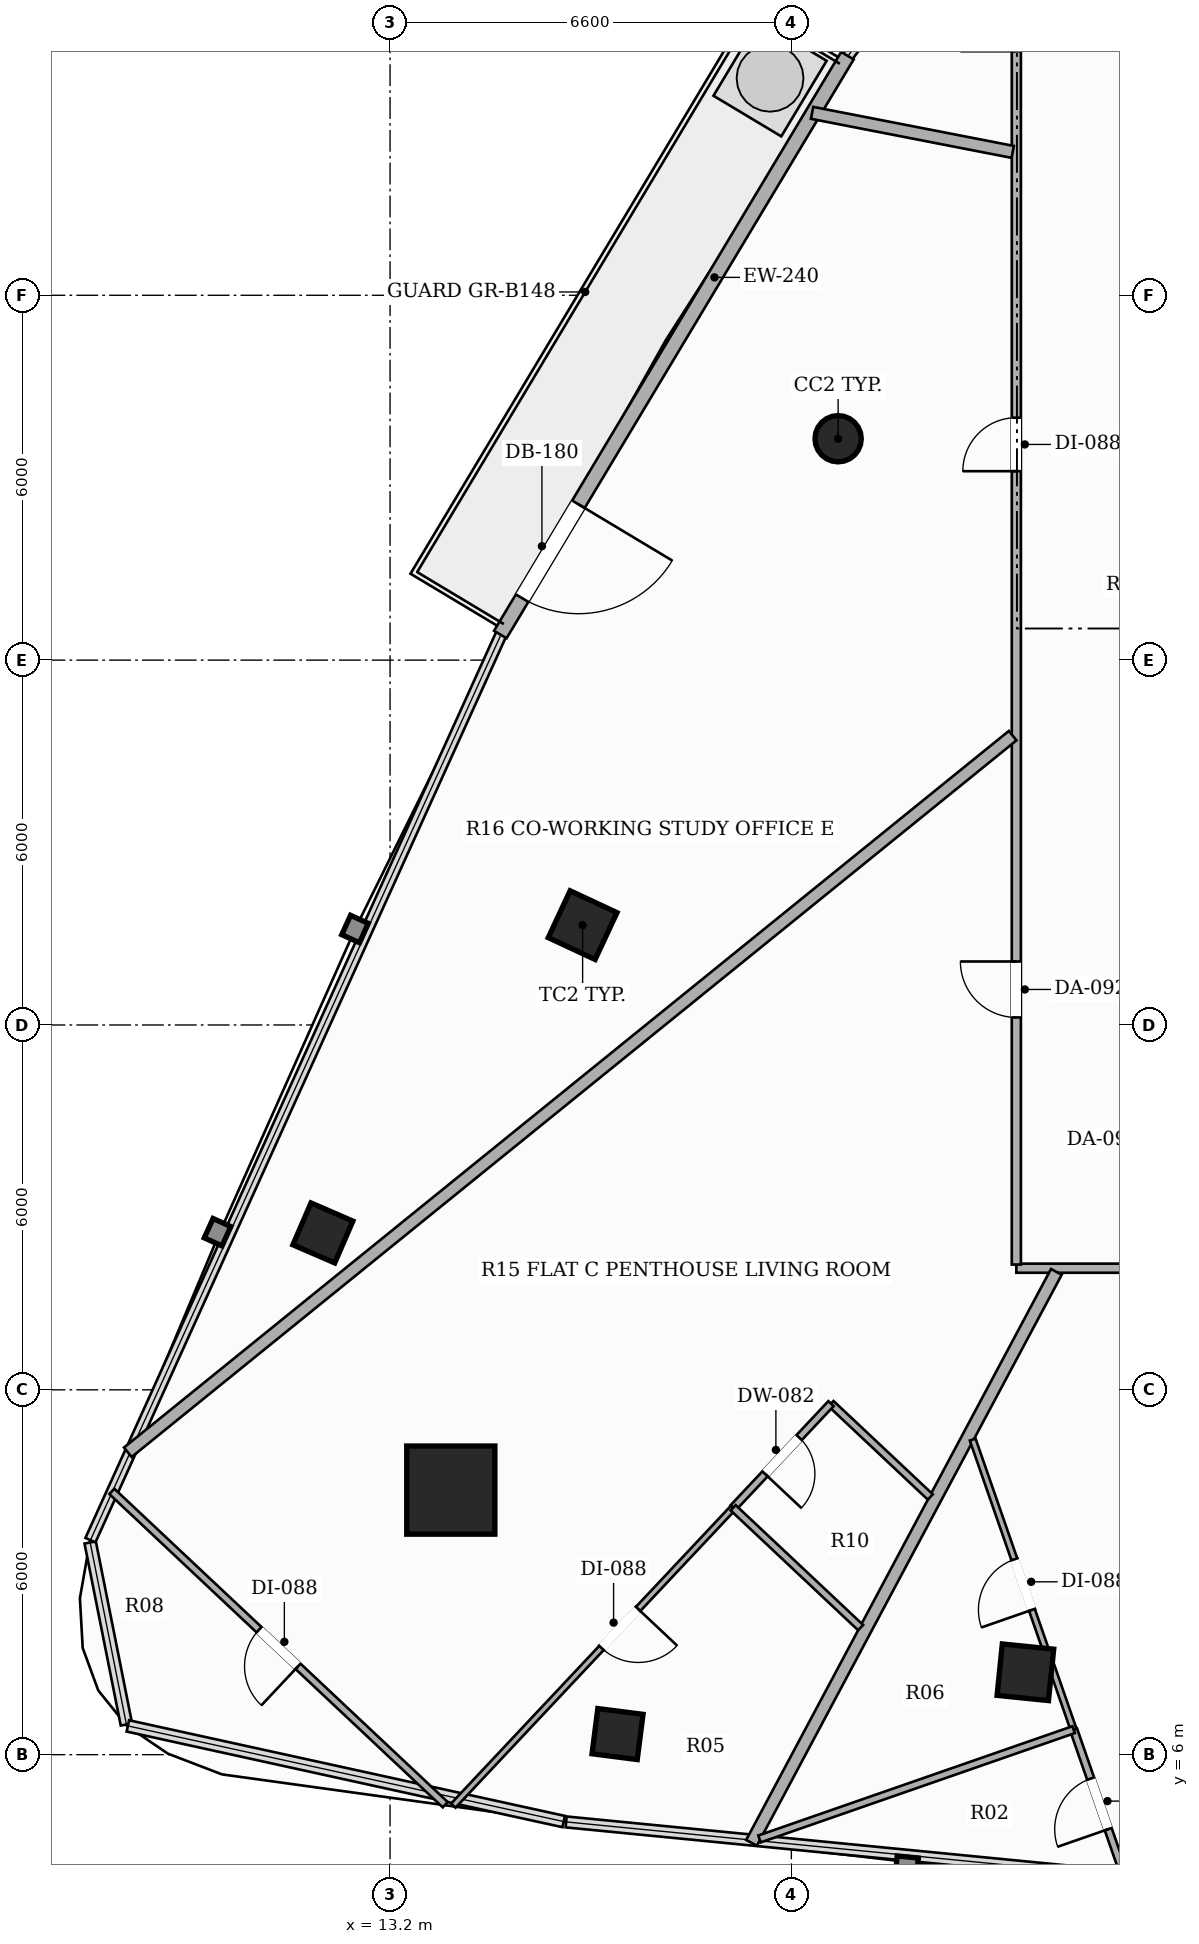
"""IFC4 building model, lengths in metres.
Left out: names, types, materials, properties, quantities, classifications, styles, units other than length and angle.
Written with IfcOpenShell. Run it as: python <this file> out.ifc"""

import sys

from ifc_helpers import new_model, si_unit, direction, frame, frame_2d, origin, origin_2d, place, context, subcontext, project, spatial, rectangle, hollow_rectangle, hollow_circle, extrude, element, fill, save


model = new_model("IFC4")
c1 = context("Model", 3, precision=1e-05, world=origin(), true_north=direction((0.0, 1.0)))
c2 = subcontext(c1, "Body", "Model", "MODEL_VIEW")
j1 = project(units=[si_unit("LENGTHUNIT", "METRE"), si_unit("PLANEANGLEUNIT", "RADIAN")], contexts=[c1])
p1 = place(None, origin())
s1 = spatial("IfcSite", under=j1, at=p1, CompositionType="ELEMENT")
p2 = place(p1, origin())
s2 = spatial("IfcBuilding", under=s1, at=p2, CompositionType="ELEMENT")
p3 = place(p2, frame((0.0, 0.0, 167.15)))
s3 = spatial("IfcBuildingStorey", under=s2, at=p3, CompositionType="ELEMENT", Elevation=167.15)
p4 = place(p3, frame((14.199, 10.351, 0.0), z_axis=(0.0, 0.0, 1.0), x_axis=(1.0, 0.0, 0.0)))
e1 = element("IfcColumn", 1, at=p4, inside=s3, PredefinedType="COLUMN", context=c2, shape_type="SweptSolid", body=[
    extrude(hollow_rectangle(XDim=1.45, YDim=1.45, WallThickness=0.045, at=origin_2d()), origin(), (0.0, 0.0, 1.0), 3.3),
])
p5 = place(p3, frame((20.569, 27.641, 0.0), z_axis=(0.0, 0.0, 1.0), x_axis=(1.0, 0.0, 0.0)))
e2 = element("IfcColumn", 2, at=p5, inside=s3, PredefinedType="COLUMN", context=c2, shape_type="SweptSolid", body=[
    extrude(hollow_circle(Radius=0.381, WallThickness=0.022, at=origin_2d()), origin(), (0.0, 0.0, 1.0), 3.3),
])
for number, where, z_axis, x_axis in (
    (3, (16.367, 19.642, 0.0), (0.0, 0.0, 1.0), (0.423, 0.906, 0.0)),
    (4, (23.649, 7.355, 0.0), (0.0, 0.0, 1.0), (-0.995, 0.101, 0.0)),
):
    element("IfcColumn", number, at=place(p3, frame(where, z_axis=z_axis, x_axis=x_axis)), inside=s3, PredefinedType="COLUMN", context=c2, shape_type="SweptSolid", body=[
        extrude(hollow_rectangle(XDim=0.85, YDim=0.85, WallThickness=0.028, at=origin_2d()), origin(), (0.0, 0.0, 1.0), 3.3),
    ])
for number, where, z_axis, x_axis in (
    (5, (12.095, 14.58, 0.0), (0.0, 0.0, 1.0), (0.397, 0.918, 0.0)),
    (6, (16.941, 6.339, 0.0), (0.0, 0.0, 1.0), (-0.992, 0.127, 0.0)),
):
    element("IfcColumn", number, at=place(p3, frame(where, z_axis=z_axis, x_axis=x_axis)), inside=s3, PredefinedType="COLUMN", context=c2, shape_type="SweptSolid", body=[
        extrude(hollow_rectangle(XDim=0.75, YDim=0.75, WallThickness=0.025, at=origin_2d()), origin(), (0.0, 0.0, 1.0), 3.3),
    ])
p6 = place(p3, frame((20.722, 33.94, 0.0), z_axis=(0.0, 0.0, 1.0), x_axis=(-0.514334017412, -0.85758994778, 0.0)))
e7 = element("IfcWall", 7, at=p6, inside=s3, PredefinedType="SOLIDWALL", context=c2, shape_type="SweptSolid", body=[
    extrude(rectangle(XDim=11.1, YDim=0.24, at=frame_2d((5.55, 0.0))), origin(), (0.0, 0.0, 1.0), 2.624),
])
p7 = place(p6, frame((8.602, 0.0, 0.0)))
e8 = element("IfcOpeningElement", 8, at=p7, cuts=e7, PredefinedType="OPENING", context=c2, shape_type="SweptSolid", body=[
    extrude(rectangle(XDim=1.8, YDim=2.2, at=frame_2d((0.9, 1.1))), frame((0.0, 0.13, 0.0), z_axis=(0.0, -1.0, 0.0), x_axis=(1.0, 0.0, 0.0)), (0.0, 0.0, 1.0), 0.26),
])
p8 = place(p3, frame((26.09, 14.0, 0.0), z_axis=(0.0, 0.0, 1.0), x_axis=(-1.0, 0.0, 0.0)))
e9 = element("IfcWall", 9, at=p8, inside=s3, PredefinedType="PARTITIONING", context=c2, shape_type="SweptSolid", body=[
    extrude(rectangle(XDim=2.59, YDim=0.15, at=frame_2d((1.295, 0.0))), origin(), (0.0, 0.0, 1.0), 2.721),
])
p9 = place(p3, frame((23.5, 14.06, 0.0), z_axis=(0.0, 0.0, 1.0), x_axis=(0.0, 1.0, 0.0)))
e10 = element("IfcWall", 10, at=p9, inside=s3, PredefinedType="PARTITIONING", context=c2, shape_type="SweptSolid", body=[
    extrude(rectangle(XDim=22.84, YDim=0.15, at=frame_2d((11.42, 0.0))), origin(), (0.0, 0.0, 1.0), 2.413),
])
p10 = place(p9, frame((4.064, 0.0, 0.0)))
e11 = element("IfcOpeningElement", 11, at=p10, cuts=e10, PredefinedType="OPENING", context=c2, shape_type="SweptSolid", body=[
    extrude(rectangle(XDim=0.92, YDim=2.15, at=frame_2d((0.46, 1.075))), frame((0.0, 0.085, 0.0), z_axis=(0.0, -1.0, 0.0), x_axis=(1.0, 0.0, 0.0)), (0.0, 0.0, 1.0), 0.17),
])
p11 = place(p9, frame((13.047, 0.0, 0.0)))
e12 = element("IfcOpeningElement", 12, at=p11, cuts=e10, PredefinedType="OPENING", context=c2, shape_type="SweptSolid", body=[
    extrude(rectangle(XDim=0.88, YDim=2.1, at=frame_2d((0.44, 1.05))), frame((0.0, 0.085, 0.0), z_axis=(0.0, -1.0, 0.0), x_axis=(1.0, 0.0, 0.0)), (0.0, 0.0, 1.0), 0.17),
])
p12 = place(p9, frame((19.953, 0.0, 0.0)))
e13 = element("IfcOpeningElement", 13, at=p12, cuts=e10, PredefinedType="OPENING", context=c2, shape_type="SweptSolid", body=[
    extrude(rectangle(XDim=0.92, YDim=2.15, at=frame_2d((0.46, 1.075))), frame((0.0, 0.085, 0.0), z_axis=(0.0, -1.0, 0.0), x_axis=(1.0, 0.0, 0.0)), (0.0, 0.0, 1.0), 0.17),
])
p13 = place(p3, frame((19.145, 4.55, 0.0), z_axis=(0.0, 0.0, 1.0), x_axis=(0.470953669838, 0.882157945533, 0.0)))
e14 = element("IfcWall", 14, at=p13, inside=s3, PredefinedType="PARTITIONING", context=c2, shape_type="SweptSolid", body=[
    extrude(rectangle(XDim=10.644, YDim=0.2, at=frame_2d((5.322, 0.0))), origin(), (0.0, 0.0, 1.0), 2.413),
])
p14 = place(p3, frame((8.887, 10.973, 0.0), z_axis=(0.0, 0.0, 1.0), x_axis=(0.777135864284, 0.629332859815, 0.0)))
e15 = element("IfcWall", 15, at=p14, inside=s3, PredefinedType="PARTITIONING", context=c2, shape_type="SweptSolid", body=[
    extrude(rectangle(XDim=18.726, YDim=0.2, at=frame_2d((9.363, 0.0))), origin(), (0.0, 0.0, 1.0), 2.413),
])
p15 = place(p3, frame((20.141, 33.0, 0.0), z_axis=(0.0, 0.0, 1.0), x_axis=(0.981579076432, -0.191056318163, 0.0)))
e16 = element("IfcWall", 16, at=p15, inside=s3, PredefinedType="PARTITIONING", context=c2, shape_type="SweptSolid", body=[
    extrude(rectangle(XDim=3.361, YDim=0.2, at=frame_2d((1.68, 0.0))), origin(), (0.0, 0.0, 1.0), 2.413),
])
p16 = place(p3, frame((25.291, 3.969, 0.0), z_axis=(0.0, 0.0, 1.0), x_axis=(-0.328440044658, 0.944524820778, 0.0)))
e17 = element("IfcWall", 17, at=p16, inside=s3, PredefinedType="PARTITIONING", context=c2, shape_type="SweptSolid", body=[
    extrude(rectangle(XDim=2.585, YDim=0.12, at=frame_2d((1.292, 0.0))), origin(), (0.0, 0.0, 1.0), 3.06),
])
p17 = place(p16, frame((0.853, 0.0, 0.0)))
e18 = element("IfcOpeningElement", 18, at=p17, cuts=e17, PredefinedType="OPENING", context=c2, shape_type="SweptSolid", body=[
    extrude(rectangle(XDim=0.88, YDim=2.1, at=frame_2d((0.44, 1.05))), frame((0.0, 0.07, 0.0), z_axis=(0.0, -1.0, 0.0), x_axis=(1.0, 0.0, 0.0)), (0.0, 0.0, 1.0), 0.14),
])
p18 = place(p3, frame((24.442, 6.411, 0.0), z_axis=(0.0, 0.0, 1.0), x_axis=(-0.328597479572, 0.944470061155, 0.0)))
e19 = element("IfcWall", 19, at=p18, inside=s3, PredefinedType="PARTITIONING", context=c2, shape_type="SweptSolid", body=[
    extrude(rectangle(XDim=5.052, YDim=0.1, at=frame_2d((2.526, 0.0))), origin(), (0.0, 0.0, 1.0), 2.413),
])
p19 = place(p18, frame((2.086, 0.0, 0.0)))
e20 = element("IfcOpeningElement", 20, at=p19, cuts=e19, PredefinedType="OPENING", context=c2, shape_type="SweptSolid", body=[
    extrude(rectangle(XDim=0.88, YDim=2.1, at=frame_2d((0.44, 1.05))), frame((0.0, 0.06, 0.0), z_axis=(0.0, -1.0, 0.0), x_axis=(1.0, 0.0, 0.0)), (0.0, 0.0, 1.0), 0.12),
])
p20 = place(p3, frame((19.276, 4.614, 0.0), z_axis=(0.0, 0.0, 1.0), x_axis=(0.944496796706, 0.328520624941, 0.0)))
e21 = element("IfcWall", 21, at=p20, inside=s3, PredefinedType="PARTITIONING", context=c2, shape_type="SweptSolid", body=[
    extrude(rectangle(XDim=5.469, YDim=0.12, at=frame_2d((2.735, 0.0))), origin(), (0.0, 0.0, 1.0), 2.619),
])
p21 = place(p3, frame((22.085, 10.238, 0.0), z_axis=(0.0, 0.0, 1.0), x_axis=(-0.728663547615, 0.684871837921, 0.0)))
e22 = element("IfcWall", 22, at=p21, inside=s3, PredefinedType="PARTITIONING", context=c2, shape_type="SweptSolid", body=[
    extrude(rectangle(XDim=2.241, YDim=0.12, at=frame_2d((1.121, 0.0))), origin(), (0.0, 0.0, 1.0), 2.721),
])
p22 = place(p3, frame((20.452, 11.773, 0.0), z_axis=(0.0, 0.0, 1.0), x_axis=(-0.684631978878, -0.728888917118, 0.0)))
e23 = element("IfcWall", 23, at=p22, inside=s3, PredefinedType="PARTITIONING", context=c2, shape_type="SweptSolid", body=[
    extrude(rectangle(XDim=2.35, YDim=0.12, at=frame_2d((1.175, 0.0))), origin(), (0.0, 0.0, 1.0), 2.721),
])
p23 = place(p22, frame((0.765, 0.0, 0.0)))
e24 = element("IfcOpeningElement", 24, at=p23, cuts=e23, PredefinedType="OPENING", context=c2, shape_type="SweptSolid", body=[
    extrude(rectangle(XDim=0.82, YDim=2.1, at=frame_2d((0.41, 1.05))), frame((0.0, 0.07, 0.0), z_axis=(0.0, -1.0, 0.0), x_axis=(1.0, 0.0, 0.0)), (0.0, 0.0, 1.0), 0.14),
])
p24 = place(p3, frame((14.108, 5.177, 0.0), z_axis=(0.0, 0.0, 1.0), x_axis=(-0.728745526687, 0.684784606525, 0.0)))
e25 = element("IfcWall", 25, at=p24, inside=s3, PredefinedType="PARTITIONING", context=c2, shape_type="SweptSolid", body=[
    extrude(rectangle(XDim=7.525, YDim=0.12, at=frame_2d((3.763, 0.0))), origin(), (0.0, 0.0, 1.0), 3.06),
])
p25 = place(p24, frame((3.323, 0.0, 0.0)))
e26 = element("IfcOpeningElement", 26, at=p25, cuts=e25, PredefinedType="OPENING", context=c2, shape_type="SweptSolid", body=[
    extrude(rectangle(XDim=0.88, YDim=2.1, at=frame_2d((0.44, 1.05))), frame((0.0, 0.07, 0.0), z_axis=(0.0, -1.0, 0.0), x_axis=(1.0, 0.0, 0.0)), (0.0, 0.0, 1.0), 0.14),
])
p26 = place(p3, frame((18.843, 10.06, 0.0), z_axis=(0.0, 0.0, 1.0), x_axis=(-0.6848274704, -0.728705246163, 0.0)))
e27 = element("IfcWall", 27, at=p26, inside=s3, PredefinedType="PARTITIONING", context=c2, shape_type="SweptSolid", body=[
    extrude(rectangle(XDim=6.721, YDim=0.1, at=frame_2d((3.361, 0.0))), origin(), (0.0, 0.0, 1.0), 2.413),
])
p27 = place(p26, frame((2.283, 0.0, 0.0)))
e28 = element("IfcOpeningElement", 28, at=p27, cuts=e27, PredefinedType="OPENING", context=c2, shape_type="SweptSolid", body=[
    extrude(rectangle(XDim=0.88, YDim=2.1, at=frame_2d((0.44, 1.05))), frame((0.0, 0.06, 0.0), z_axis=(0.0, -1.0, 0.0), x_axis=(1.0, 0.0, 0.0)), (0.0, 0.0, 1.0), 0.12),
])
p28 = place(p3, frame((20.939, 8.09, 0.0), z_axis=(0.0, 0.0, 1.0), x_axis=(-0.728665789254, 0.68486945294, 0.0)))
e29 = element("IfcWall", 29, at=p28, inside=s3, PredefinedType="PARTITIONING", context=c2, shape_type="SweptSolid", body=[
    extrude(rectangle(XDim=2.876, YDim=0.12, at=frame_2d((1.438, 0.0))), origin(), (0.0, 0.0, 1.0), 2.721),
])
p29 = place(p7, origin())
e30 = element("IfcDoor", 30, at=p29, inside=s3, OperationType="SINGLE_SWING_LEFT", PredefinedType="DOOR", context=c2, shape_type="SweptSolid", body=[
    extrude(rectangle(XDim=1.8, YDim=2.2, at=frame_2d((0.9, 1.1))), frame((0.0, 0.025, 0.0), z_axis=(0.0, -1.0, 0.0), x_axis=(1.0, 0.0, 0.0)), (0.0, 0.0, 1.0), 0.05),
])
fill(e8, e30)
p30 = place(p17, origin())
e31 = element("IfcDoor", 31, at=p30, inside=s3, OperationType="SINGLE_SWING_LEFT", PredefinedType="DOOR", context=c2, shape_type="SweptSolid", body=[
    extrude(rectangle(XDim=0.88, YDim=2.1, at=frame_2d((0.44, 1.05))), frame((0.0, 0.025, 0.0), z_axis=(0.0, -1.0, 0.0), x_axis=(1.0, 0.0, 0.0)), (0.0, 0.0, 1.0), 0.05),
])
fill(e18, e31)
p31 = place(p19, origin())
e32 = element("IfcDoor", 32, at=p31, inside=s3, OperationType="SINGLE_SWING_LEFT", PredefinedType="DOOR", context=c2, shape_type="SweptSolid", body=[
    extrude(rectangle(XDim=0.88, YDim=2.1, at=frame_2d((0.44, 1.05))), frame((0.0, 0.025, 0.0), z_axis=(0.0, -1.0, 0.0), x_axis=(1.0, 0.0, 0.0)), (0.0, 0.0, 1.0), 0.05),
])
fill(e20, e32)
p32 = place(p10, origin())
e33 = element("IfcDoor", 33, at=p32, inside=s3, OperationType="SINGLE_SWING_RIGHT", PredefinedType="DOOR", context=c2, shape_type="SweptSolid", body=[
    extrude(rectangle(XDim=0.92, YDim=2.15, at=frame_2d((0.46, 1.075))), frame((0.0, 0.025, 0.0), z_axis=(0.0, -1.0, 0.0), x_axis=(1.0, 0.0, 0.0)), (0.0, 0.0, 1.0), 0.05),
])
fill(e11, e33)
p33 = place(p23, origin())
e34 = element("IfcDoor", 34, at=p33, inside=s3, OperationType="SINGLE_SWING_RIGHT", PredefinedType="DOOR", context=c2, shape_type="SweptSolid", body=[
    extrude(rectangle(XDim=0.82, YDim=2.1, at=frame_2d((0.41, 1.05))), frame((0.0, 0.025, 0.0), z_axis=(0.0, -1.0, 0.0), x_axis=(1.0, 0.0, 0.0)), (0.0, 0.0, 1.0), 0.05),
])
fill(e24, e34)
p34 = place(p25, origin())
e35 = element("IfcDoor", 35, at=p34, inside=s3, OperationType="SINGLE_SWING_LEFT", PredefinedType="DOOR", context=c2, shape_type="SweptSolid", body=[
    extrude(rectangle(XDim=0.88, YDim=2.1, at=frame_2d((0.44, 1.05))), frame((0.0, 0.025, 0.0), z_axis=(0.0, -1.0, 0.0), x_axis=(1.0, 0.0, 0.0)), (0.0, 0.0, 1.0), 0.05),
])
fill(e26, e35)
p35 = place(p27, origin())
e36 = element("IfcDoor", 36, at=p35, inside=s3, OperationType="SINGLE_SWING_LEFT", PredefinedType="DOOR", context=c2, shape_type="SweptSolid", body=[
    extrude(rectangle(XDim=0.88, YDim=2.1, at=frame_2d((0.44, 1.05))), frame((0.0, 0.025, 0.0), z_axis=(0.0, -1.0, 0.0), x_axis=(1.0, 0.0, 0.0)), (0.0, 0.0, 1.0), 0.05),
])
fill(e28, e36)
p36 = place(p11, origin())
e37 = element("IfcDoor", 37, at=p36, inside=s3, OperationType="SINGLE_SWING_LEFT", PredefinedType="DOOR", context=c2, shape_type="SweptSolid", body=[
    extrude(rectangle(XDim=0.88, YDim=2.1, at=frame_2d((0.44, 1.05))), frame((0.0, 0.025, 0.0), z_axis=(0.0, -1.0, 0.0), x_axis=(1.0, 0.0, 0.0)), (0.0, 0.0, 1.0), 0.05),
])
fill(e12, e37)
save(model, sys.argv[1])
